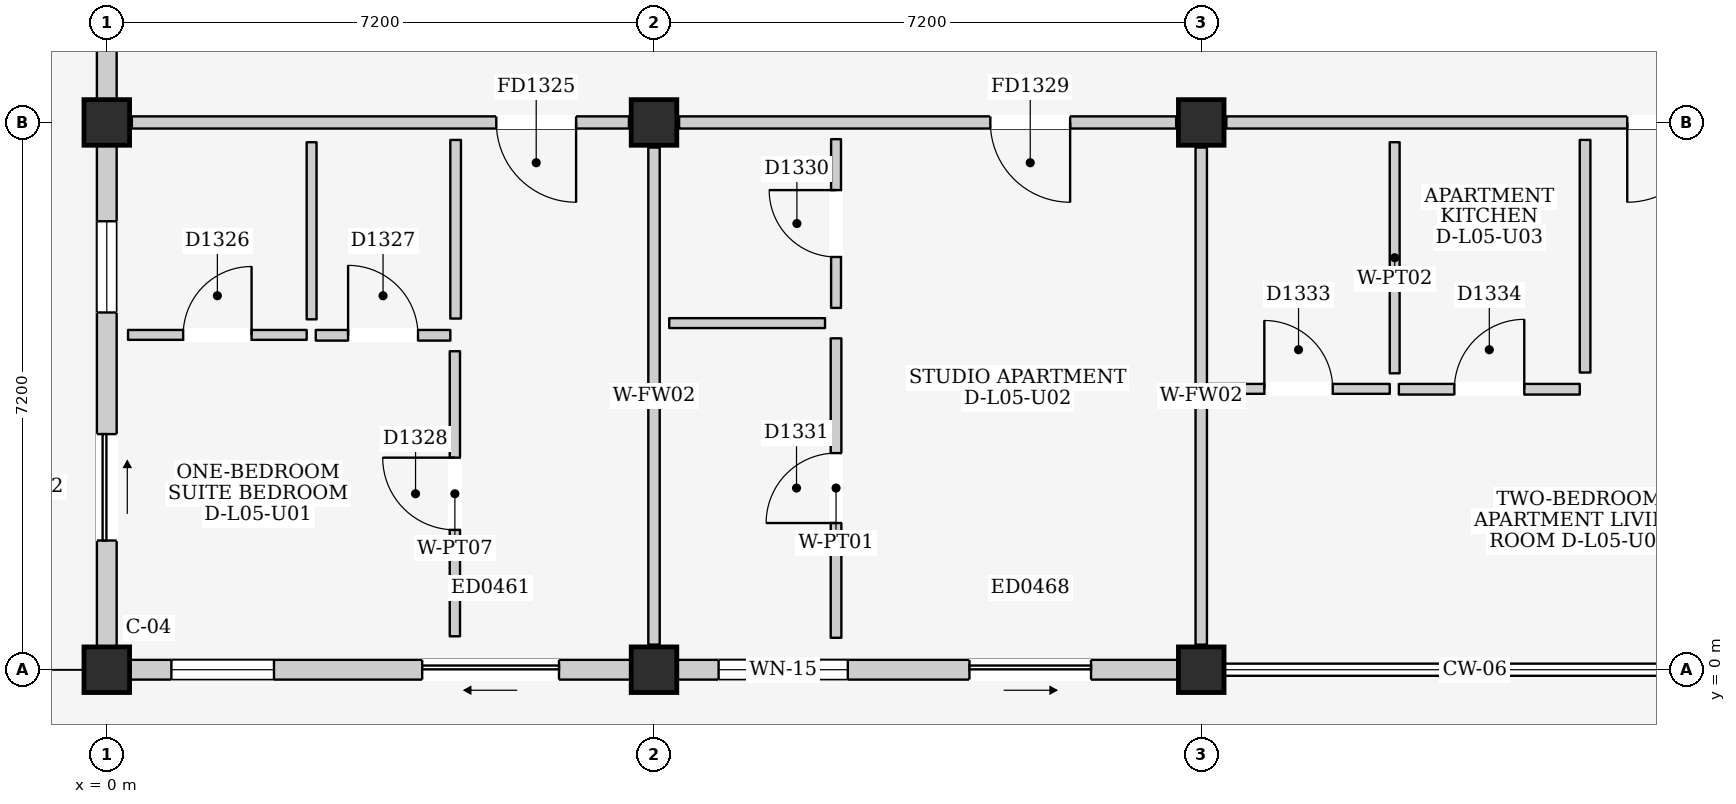
"""IFC4 building model, lengths in metres.
Left out: names, types, materials, properties, quantities, classifications, styles, units other than length and angle.
Written with IfcOpenShell. Run it as: python <this file> out.ifc"""

import sys

from ifc_helpers import new_model, si_unit, direction, frame, frame_2d, origin, origin_2d, place, context, subcontext, project, spatial, rectangle, extrude, element, fill, save


model = new_model("IFC4")
c1 = context("Model", 3, precision=1e-05, world=origin(), true_north=direction((0.0, 1.0)))
c2 = subcontext(c1, "Body", "Model", "MODEL_VIEW")
j1 = project(units=[si_unit("LENGTHUNIT", "METRE"), si_unit("PLANEANGLEUNIT", "RADIAN")], contexts=[c1])
p1 = place(None, origin())
s1 = spatial("IfcSite", under=j1, at=p1, CompositionType="ELEMENT")
p2 = place(p1, origin())
s2 = spatial("IfcBuilding", under=s1, at=p2, CompositionType="ELEMENT")
p3 = place(p2, frame((0.0, 0.0, 18.6)))
s3 = spatial("IfcBuildingStorey", under=s2, at=p3, CompositionType="ELEMENT", Elevation=18.6)
for number, where, z_axis, x_axis in (
    (1, (0.0, 0.0, 0.0), (0.0, 0.0, 1.0), (1.0, 0.0, 0.0)),
    (2, (0.0, 7.2, 0.0), (0.0, 0.0, 1.0), (1.0, 0.0, 0.0)),
    (3, (7.2, 0.0, 0.0), (0.0, 0.0, 1.0), (1.0, 0.0, 0.0)),
    (4, (7.2, 7.2, 0.0), (0.0, 0.0, 1.0), (1.0, 0.0, 0.0)),
    (5, (14.4, 0.0, 0.0), (0.0, 0.0, 1.0), (1.0, 0.0, 0.0)),
    (6, (14.4, 7.2, 0.0), (0.0, 0.0, 1.0), (1.0, 0.0, 0.0)),
):
    element("IfcColumn", number, at=place(p3, frame(where, z_axis=z_axis, x_axis=x_axis)), inside=s3, PredefinedType="COLUMN", context=c2, shape_type="SweptSolid", body=[
        extrude(rectangle(XDim=0.6, YDim=0.6, at=origin_2d()), origin(), (0.0, 0.0, 1.0), 3.3),
    ])
p4 = place(p3, frame((0.3, 0.0, 0.0), z_axis=(0.0, 0.0, 1.0), x_axis=(1.0, 0.0, 0.0)))
e7 = element("IfcWall", 7, at=p4, inside=s3, PredefinedType="ELEMENTEDWALL", context=c2, shape_type="SweptSolid", body=[
    extrude(rectangle(XDim=6.6, YDim=0.26, at=frame_2d((3.3, 0.0))), origin(), (0.0, 0.0, 1.0), 2.595),
])
p5 = place(p4, frame((3.85, 0.0, 0.0)))
e8 = element("IfcOpeningElement", 8, at=p5, cuts=e7, PredefinedType="OPENING", context=c2, shape_type="SweptSolid", body=[
    extrude(rectangle(XDim=1.8, YDim=2.12, at=frame_2d((0.9, 1.06))), frame((0.0, 0.145, 0.0), z_axis=(0.0, -1.0, 0.0), x_axis=(1.0, 0.0, 0.0)), (0.0, 0.0, 1.0), 0.29),
])
p6 = place(p4, frame((0.55, 0.0, 0.9)))
e9 = element("IfcOpeningElement", 9, at=p6, cuts=e7, PredefinedType="OPENING", context=c2, shape_type="SweptSolid", body=[
    extrude(rectangle(XDim=1.35, YDim=1.5, at=frame_2d((0.675, 0.75))), frame((0.0, 0.145, 0.0), z_axis=(0.0, -1.0, 0.0), x_axis=(1.0, 0.0, 0.0)), (0.0, 0.0, 1.0), 0.29),
])
p7 = place(p3, frame((0.0, 0.3, 0.0), z_axis=(0.0, 0.0, 1.0), x_axis=(0.0, 1.0, 0.0)))
e10 = element("IfcWall", 10, at=p7, inside=s3, PredefinedType="ELEMENTEDWALL", context=c2, shape_type="SweptSolid", body=[
    extrude(rectangle(XDim=6.6, YDim=0.26, at=frame_2d((3.3, 0.0))), origin(), (0.0, 0.0, 1.0), 2.595),
])
p8 = place(p7, frame((1.4, 0.0, 0.0)))
e11 = element("IfcOpeningElement", 11, at=p8, cuts=e10, PredefinedType="OPENING", context=c2, shape_type="SweptSolid", body=[
    extrude(rectangle(XDim=1.4, YDim=2.1, at=frame_2d((0.7, 1.05))), frame((0.0, 0.145, 0.0), z_axis=(0.0, -1.0, 0.0), x_axis=(1.0, 0.0, 0.0)), (0.0, 0.0, 1.0), 0.29),
])
p9 = place(p7, frame((4.4, 0.0, 0.95)))
e12 = element("IfcOpeningElement", 12, at=p9, cuts=e10, PredefinedType="OPENING", context=c2, shape_type="SweptSolid", body=[
    extrude(rectangle(XDim=1.2, YDim=1.35, at=frame_2d((0.6, 0.675))), frame((0.0, 0.145, 0.0), z_axis=(0.0, -1.0, 0.0), x_axis=(1.0, 0.0, 0.0)), (0.0, 0.0, 1.0), 0.29),
])
p10 = place(p3, frame((0.0, 7.5, 0.0), z_axis=(0.0, 0.0, 1.0), x_axis=(0.0, 1.0, 0.0)))
e13 = element("IfcWall", 13, at=p10, inside=s3, PredefinedType="ELEMENTEDWALL", context=c2, shape_type="SweptSolid", body=[
    extrude(rectangle(XDim=6.6, YDim=0.26, at=frame_2d((3.3, 0.0))), origin(), (0.0, 0.0, 1.0), 2.595),
])
p11 = place(p10, frame((3.65, 0.0, 0.0)))
e14 = element("IfcOpeningElement", 14, at=p11, cuts=e13, PredefinedType="OPENING", context=c2, shape_type="SweptSolid", body=[
    extrude(rectangle(XDim=1.4, YDim=2.1, at=frame_2d((0.7, 1.05))), frame((0.0, 0.145, 0.0), z_axis=(0.0, -1.0, 0.0), x_axis=(1.0, 0.0, 0.0)), (0.0, 0.0, 1.0), 0.29),
])
p12 = place(p3, frame((7.5, 0.0, 0.0), z_axis=(0.0, 0.0, 1.0), x_axis=(1.0, 0.0, 0.0)))
e15 = element("IfcWall", 15, at=p12, inside=s3, PredefinedType="ELEMENTEDWALL", context=c2, shape_type="SweptSolid", body=[
    extrude(rectangle(XDim=6.6, YDim=0.26, at=frame_2d((3.3, 0.0))), origin(), (0.0, 0.0, 1.0), 2.595),
])
p13 = place(p12, frame((3.85, 0.0, 0.0)))
e16 = element("IfcOpeningElement", 16, at=p13, cuts=e15, PredefinedType="OPENING", context=c2, shape_type="SweptSolid", body=[
    extrude(rectangle(XDim=1.6, YDim=2.12, at=frame_2d((0.8, 1.06))), frame((0.0, 0.145, 0.0), z_axis=(0.0, -1.0, 0.0), x_axis=(1.0, 0.0, 0.0)), (0.0, 0.0, 1.0), 0.29),
])
p14 = place(p12, frame((0.55, 0.0, 0.9)))
e17 = element("IfcOpeningElement", 17, at=p14, cuts=e15, PredefinedType="OPENING", context=c2, shape_type="SweptSolid", body=[
    extrude(rectangle(XDim=1.7, YDim=1.45, at=frame_2d((0.85, 0.725))), frame((0.0, 0.145, 0.0), z_axis=(0.0, -1.0, 0.0), x_axis=(1.0, 0.0, 0.0)), (0.0, 0.0, 1.0), 0.29),
])
p15 = place(p3, frame((0.33, 7.2, 0.0), z_axis=(0.0, 0.0, 1.0), x_axis=(1.0, 0.0, 0.0)))
e18 = element("IfcWall", 18, at=p15, inside=s3, PredefinedType="PARTITIONING", context=c2, shape_type="SweptSolid", body=[
    extrude(rectangle(XDim=6.54, YDim=0.16, at=frame_2d((3.27, 0.0))), origin(), (0.0, 0.0, 1.0), 2.445),
])
p16 = place(p15, frame((4.795, 0.0, 0.0)))
e19 = element("IfcOpeningElement", 19, at=p16, cuts=e18, PredefinedType="OPENING", context=c2, shape_type="SweptSolid", body=[
    extrude(rectangle(XDim=1.05, YDim=2.15, at=frame_2d((0.525, 1.075))), frame((0.0, 0.095, 0.0), z_axis=(0.0, -1.0, 0.0), x_axis=(1.0, 0.0, 0.0)), (0.0, 0.0, 1.0), 0.19),
])
p17 = place(p3, frame((7.2, 0.33, 0.0), z_axis=(0.0, 0.0, 1.0), x_axis=(0.0, 1.0, 0.0)))
e20 = element("IfcWall", 20, at=p17, inside=s3, PredefinedType="PARTITIONING", context=c2, shape_type="SweptSolid", body=[
    extrude(rectangle(XDim=6.54, YDim=0.15, at=frame_2d((3.27, 0.0))), origin(), (0.0, 0.0, 1.0), 2.545),
])
p18 = place(p3, frame((0.28, 4.405, 0.0), z_axis=(0.0, 0.0, 1.0), x_axis=(1.0, 0.0, 0.0)))
e21 = element("IfcWall", 21, at=p18, inside=s3, PredefinedType="PARTITIONING", context=c2, shape_type="SweptSolid", body=[
    extrude(rectangle(XDim=2.35, YDim=0.13, at=frame_2d((1.175, 0.0))), origin(), (0.0, 0.0, 1.0), 3.06),
])
p19 = place(p18, frame((0.725, 0.0, 0.0)))
e22 = element("IfcOpeningElement", 22, at=p19, cuts=e21, PredefinedType="OPENING", context=c2, shape_type="SweptSolid", body=[
    extrude(rectangle(XDim=0.9, YDim=2.1, at=frame_2d((0.45, 1.05))), frame((0.0, 0.08, 0.0), z_axis=(0.0, -1.0, 0.0), x_axis=(1.0, 0.0, 0.0)), (0.0, 0.0, 1.0), 0.16),
])
p20 = place(p3, frame((2.695, 4.61, 0.0), z_axis=(0.0, 0.0, 1.0), x_axis=(0.0, 1.0, 0.0)))
e23 = element("IfcWall", 23, at=p20, inside=s3, PredefinedType="PARTITIONING", context=c2, shape_type="SweptSolid", body=[
    extrude(rectangle(XDim=2.33, YDim=0.13, at=frame_2d((1.165, 0.0))), origin(), (0.0, 0.0, 1.0), 3.06),
])
p21 = place(p3, frame((2.75, 4.4, 0.0), z_axis=(0.0, 0.0, 1.0), x_axis=(1.0, 0.0, 0.0)))
e24 = element("IfcWall", 24, at=p21, inside=s3, PredefinedType="PARTITIONING", context=c2, shape_type="SweptSolid", body=[
    extrude(rectangle(XDim=1.77, YDim=0.14, at=frame_2d((0.885, 0.0))), origin(), (0.0, 0.0, 1.0), 3.06),
])
p22 = place(p21, frame((0.425, 0.0, 0.0)))
e25 = element("IfcOpeningElement", 25, at=p22, cuts=e24, PredefinedType="OPENING", context=c2, shape_type="SweptSolid", body=[
    extrude(rectangle(XDim=0.92, YDim=2.1, at=frame_2d((0.46, 1.05))), frame((0.0, 0.085, 0.0), z_axis=(0.0, -1.0, 0.0), x_axis=(1.0, 0.0, 0.0)), (0.0, 0.0, 1.0), 0.17),
])
p23 = place(p3, frame((4.59, 4.62, 0.0), z_axis=(0.0, 0.0, 1.0), x_axis=(0.0, 1.0, 0.0)))
e26 = element("IfcWall", 26, at=p23, inside=s3, PredefinedType="PARTITIONING", context=c2, shape_type="SweptSolid", body=[
    extrude(rectangle(XDim=2.35, YDim=0.14, at=frame_2d((1.175, 0.0))), origin(), (0.0, 0.0, 1.0), 3.06),
])
p24 = place(p3, frame((4.58, 0.44, 0.0), z_axis=(0.0, 0.0, 1.0), x_axis=(0.0, 1.0, 0.0)))
e27 = element("IfcWall", 27, at=p24, inside=s3, PredefinedType="PARTITIONING", context=c2, shape_type="SweptSolid", body=[
    extrude(rectangle(XDim=3.75, YDim=0.135, at=frame_2d((1.875, 0.0))), origin(), (0.0, 0.0, 1.0), 3.06),
])
p25 = place(p24, frame((1.4, 0.0, 0.0)))
e28 = element("IfcOpeningElement", 28, at=p25, cuts=e27, PredefinedType="OPENING", context=c2, shape_type="SweptSolid", body=[
    extrude(rectangle(XDim=0.95, YDim=2.15, at=frame_2d((0.475, 1.075))), frame((0.0, 0.083, 0.0), z_axis=(0.0, -1.0, 0.0), x_axis=(1.0, 0.0, 0.0)), (0.0, 0.0, 1.0), 0.165),
])
p26 = place(p3, frame((7.53, 7.2, 0.0), z_axis=(0.0, 0.0, 1.0), x_axis=(1.0, 0.0, 0.0)))
e29 = element("IfcWall", 29, at=p26, inside=s3, PredefinedType="PARTITIONING", context=c2, shape_type="SweptSolid", body=[
    extrude(rectangle(XDim=6.54, YDim=0.16, at=frame_2d((3.27, 0.0))), origin(), (0.0, 0.0, 1.0), 2.445),
])
p27 = place(p26, frame((4.095, 0.0, 0.0)))
e30 = element("IfcOpeningElement", 30, at=p27, cuts=e29, PredefinedType="OPENING", context=c2, shape_type="SweptSolid", body=[
    extrude(rectangle(XDim=1.05, YDim=2.15, at=frame_2d((0.525, 1.075))), frame((0.0, 0.095, 0.0), z_axis=(0.0, -1.0, 0.0), x_axis=(1.0, 0.0, 0.0)), (0.0, 0.0, 1.0), 0.19),
])
p28 = place(p3, frame((14.4, 0.33, 0.0), z_axis=(0.0, 0.0, 1.0), x_axis=(0.0, 1.0, 0.0)))
e31 = element("IfcWall", 31, at=p28, inside=s3, PredefinedType="PARTITIONING", context=c2, shape_type="SweptSolid", body=[
    extrude(rectangle(XDim=6.54, YDim=0.15, at=frame_2d((3.27, 0.0))), origin(), (0.0, 0.0, 1.0), 2.545),
])
p29 = place(p3, frame((7.4, 4.56, 0.0), z_axis=(0.0, 0.0, 1.0), x_axis=(1.0, 0.0, 0.0)))
e32 = element("IfcWall", 32, at=p29, inside=s3, PredefinedType="PARTITIONING", context=c2, shape_type="SweptSolid", body=[
    extrude(rectangle(XDim=2.05, YDim=0.13, at=frame_2d((1.025, 0.0))), origin(), (0.0, 0.0, 1.0), 3.06),
])
p30 = place(p3, frame((9.595, 4.76, 0.0), z_axis=(0.0, 0.0, 1.0), x_axis=(0.0, 1.0, 0.0)))
e33 = element("IfcWall", 33, at=p30, inside=s3, PredefinedType="PARTITIONING", context=c2, shape_type="SweptSolid", body=[
    extrude(rectangle(XDim=2.22, YDim=0.13, at=frame_2d((1.11, 0.0))), origin(), (0.0, 0.0, 1.0), 3.06),
])
p31 = place(p30, frame((0.67, 0.0, 0.0)))
e34 = element("IfcOpeningElement", 34, at=p31, cuts=e33, PredefinedType="OPENING", context=c2, shape_type="SweptSolid", body=[
    extrude(rectangle(XDim=0.88, YDim=2.1, at=frame_2d((0.44, 1.05))), frame((0.0, 0.08, 0.0), z_axis=(0.0, -1.0, 0.0), x_axis=(1.0, 0.0, 0.0)), (0.0, 0.0, 1.0), 0.16),
])
p32 = place(p3, frame((9.595, 0.42, 0.0), z_axis=(0.0, 0.0, 1.0), x_axis=(0.0, 1.0, 0.0)))
e35 = element("IfcWall", 35, at=p32, inside=s3, PredefinedType="PARTITIONING", context=c2, shape_type="SweptSolid", body=[
    extrude(rectangle(XDim=3.94, YDim=0.14, at=frame_2d((1.97, 0.0))), origin(), (0.0, 0.0, 1.0), 3.06),
])
p33 = place(p32, frame((1.51, 0.0, 0.0)))
e36 = element("IfcOpeningElement", 36, at=p33, cuts=e35, PredefinedType="OPENING", context=c2, shape_type="SweptSolid", body=[
    extrude(rectangle(XDim=0.92, YDim=2.1, at=frame_2d((0.46, 1.05))), frame((0.0, 0.085, 0.0), z_axis=(0.0, -1.0, 0.0), x_axis=(1.0, 0.0, 0.0)), (0.0, 0.0, 1.0), 0.17),
])
p34 = place(p3, frame((14.73, 7.2, 0.0), z_axis=(0.0, 0.0, 1.0), x_axis=(1.0, 0.0, 0.0)))
e37 = element("IfcWall", 37, at=p34, inside=s3, PredefinedType="PARTITIONING", context=c2, shape_type="SweptSolid", body=[
    extrude(rectangle(XDim=6.54, YDim=0.16, at=frame_2d((3.27, 0.0))), origin(), (0.0, 0.0, 1.0), 2.445),
])
p35 = place(p34, frame((5.275, 0.0, 0.0)))
e38 = element("IfcOpeningElement", 38, at=p35, cuts=e37, PredefinedType="OPENING", context=c2, shape_type="SweptSolid", body=[
    extrude(rectangle(XDim=1.05, YDim=2.15, at=frame_2d((0.525, 1.075))), frame((0.0, 0.095, 0.0), z_axis=(0.0, -1.0, 0.0), x_axis=(1.0, 0.0, 0.0)), (0.0, 0.0, 1.0), 0.19),
])
p36 = place(p3, frame((14.48, 3.695, 0.0), z_axis=(0.0, 0.0, 1.0), x_axis=(1.0, 0.0, 0.0)))
e39 = element("IfcWall", 39, at=p36, inside=s3, PredefinedType="PARTITIONING", context=c2, shape_type="SweptSolid", body=[
    extrude(rectangle(XDim=2.4, YDim=0.13, at=frame_2d((1.2, 0.0))), origin(), (0.0, 0.0, 1.0), 3.06),
])
p37 = place(p36, frame((0.75, 0.0, 0.0)))
e40 = element("IfcOpeningElement", 40, at=p37, cuts=e39, PredefinedType="OPENING", context=c2, shape_type="SweptSolid", body=[
    extrude(rectangle(XDim=0.9, YDim=2.1, at=frame_2d((0.45, 1.05))), frame((0.0, 0.08, 0.0), z_axis=(0.0, -1.0, 0.0), x_axis=(1.0, 0.0, 0.0)), (0.0, 0.0, 1.0), 0.16),
])
p38 = place(p3, frame((16.945, 3.9, 0.0), z_axis=(0.0, 0.0, 1.0), x_axis=(0.0, 1.0, 0.0)))
e41 = element("IfcWall", 41, at=p38, inside=s3, PredefinedType="PARTITIONING", context=c2, shape_type="SweptSolid", body=[
    extrude(rectangle(XDim=3.04, YDim=0.13, at=frame_2d((1.52, 0.0))), origin(), (0.0, 0.0, 1.0), 3.06),
])
p39 = place(p3, frame((17.0, 3.69, 0.0), z_axis=(0.0, 0.0, 1.0), x_axis=(1.0, 0.0, 0.0)))
e42 = element("IfcWall", 42, at=p39, inside=s3, PredefinedType="PARTITIONING", context=c2, shape_type="SweptSolid", body=[
    extrude(rectangle(XDim=2.38, YDim=0.14, at=frame_2d((1.19, 0.0))), origin(), (0.0, 0.0, 1.0), 3.06),
])
p40 = place(p39, frame((0.73, 0.0, 0.0)))
e43 = element("IfcOpeningElement", 43, at=p40, cuts=e42, PredefinedType="OPENING", context=c2, shape_type="SweptSolid", body=[
    extrude(rectangle(XDim=0.92, YDim=2.1, at=frame_2d((0.46, 1.05))), frame((0.0, 0.085, 0.0), z_axis=(0.0, -1.0, 0.0), x_axis=(1.0, 0.0, 0.0)), (0.0, 0.0, 1.0), 0.17),
])
p41 = place(p3, frame((19.45, 3.91, 0.0), z_axis=(0.0, 0.0, 1.0), x_axis=(0.0, 1.0, 0.0)))
e44 = element("IfcWall", 44, at=p41, inside=s3, PredefinedType="PARTITIONING", context=c2, shape_type="SweptSolid", body=[
    extrude(rectangle(XDim=3.06, YDim=0.14, at=frame_2d((1.53, 0.0))), origin(), (0.0, 0.0, 1.0), 3.06),
])
p42 = place(p5, frame((1.8, 0.0, 0.0), z_axis=(0.0, 0.0, 1.0), x_axis=(-1.0, 0.0, 0.0)))
e45 = element("IfcDoor", 45, at=p42, inside=s3, OperationType="SLIDING_TO_LEFT", PredefinedType="DOOR", context=c2, shape_type="SweptSolid", body=[
    extrude(rectangle(XDim=1.8, YDim=2.12, at=frame_2d((0.9, 1.06))), frame((0.0, 0.025, 0.0), z_axis=(0.0, -1.0, 0.0), x_axis=(1.0, 0.0, 0.0)), (0.0, 0.0, 1.0), 0.05),
])
fill(e8, e45)
p43 = place(p6, origin())
e46 = element("IfcWindow", 46, at=p43, inside=s3, PartitioningType="SINGLE_PANEL", PredefinedType="WINDOW", context=c2, shape_type="SweptSolid", body=[
    extrude(rectangle(XDim=1.35, YDim=1.5, at=frame_2d((0.675, 0.75))), frame((0.0, 0.03, 0.0), z_axis=(0.0, -1.0, 0.0), x_axis=(1.0, 0.0, 0.0)), (0.0, 0.0, 1.0), 0.06),
])
fill(e9, e46)
p44 = place(p8, frame((1.4, 0.0, 0.0), z_axis=(0.0, 0.0, 1.0), x_axis=(-1.0, 0.0, 0.0)))
e47 = element("IfcDoor", 47, at=p44, inside=s3, OperationType="SLIDING_TO_RIGHT", PredefinedType="DOOR", context=c2, shape_type="SweptSolid", body=[
    extrude(rectangle(XDim=1.4, YDim=2.1, at=frame_2d((0.7, 1.05))), frame((0.0, 0.025, 0.0), z_axis=(0.0, -1.0, 0.0), x_axis=(1.0, 0.0, 0.0)), (0.0, 0.0, 1.0), 0.05),
])
fill(e11, e47)
p45 = place(p9, origin())
e48 = element("IfcWindow", 48, at=p45, inside=s3, PartitioningType="SINGLE_PANEL", PredefinedType="WINDOW", context=c2, shape_type="SweptSolid", body=[
    extrude(rectangle(XDim=1.2, YDim=1.35, at=frame_2d((0.6, 0.675))), frame((0.0, 0.03, 0.0), z_axis=(0.0, -1.0, 0.0), x_axis=(1.0, 0.0, 0.0)), (0.0, 0.0, 1.0), 0.06),
])
fill(e12, e48)
p46 = place(p13, frame((1.6, 0.0, 0.0), z_axis=(0.0, 0.0, 1.0), x_axis=(-1.0, 0.0, 0.0)))
e49 = element("IfcDoor", 49, at=p46, inside=s3, OperationType="SLIDING_TO_RIGHT", PredefinedType="DOOR", context=c2, shape_type="SweptSolid", body=[
    extrude(rectangle(XDim=1.6, YDim=2.12, at=frame_2d((0.8, 1.06))), frame((0.0, 0.025, 0.0), z_axis=(0.0, -1.0, 0.0), x_axis=(1.0, 0.0, 0.0)), (0.0, 0.0, 1.0), 0.05),
])
fill(e16, e49)
p47 = place(p14, origin())
e50 = element("IfcWindow", 50, at=p47, inside=s3, PartitioningType="DOUBLE_PANEL_VERTICAL", PredefinedType="WINDOW", context=c2, shape_type="SweptSolid", body=[
    extrude(rectangle(XDim=1.7, YDim=1.45, at=frame_2d((0.85, 0.725))), frame((0.0, 0.03, 0.0), z_axis=(0.0, -1.0, 0.0), x_axis=(1.0, 0.0, 0.0)), (0.0, 0.0, 1.0), 0.06),
])
fill(e17, e50)
p48 = place(p16, frame((1.05, 0.0, 0.0), z_axis=(0.0, 0.0, 1.0), x_axis=(-1.0, 0.0, 0.0)))
e51 = element("IfcDoor", 51, at=p48, inside=s3, OperationType="SINGLE_SWING_LEFT", PredefinedType="DOOR", context=c2, shape_type="SweptSolid", body=[
    extrude(rectangle(XDim=1.05, YDim=2.15, at=frame_2d((0.525, 1.075))), frame((0.0, 0.025, 0.0), z_axis=(0.0, -1.0, 0.0), x_axis=(1.0, 0.0, 0.0)), (0.0, 0.0, 1.0), 0.05),
])
fill(e19, e51)
p49 = place(p19, origin())
e52 = element("IfcDoor", 52, at=p49, inside=s3, OperationType="SINGLE_SWING_RIGHT", PredefinedType="DOOR", context=c2, shape_type="SweptSolid", body=[
    extrude(rectangle(XDim=0.9, YDim=2.1, at=frame_2d((0.45, 1.05))), frame((0.0, 0.025, 0.0), z_axis=(0.0, -1.0, 0.0), x_axis=(1.0, 0.0, 0.0)), (0.0, 0.0, 1.0), 0.05),
])
fill(e22, e52)
p50 = place(p22, origin())
e53 = element("IfcDoor", 53, at=p50, inside=s3, OperationType="SINGLE_SWING_LEFT", PredefinedType="DOOR", context=c2, shape_type="SweptSolid", body=[
    extrude(rectangle(XDim=0.92, YDim=2.1, at=frame_2d((0.46, 1.05))), frame((0.0, 0.025, 0.0), z_axis=(0.0, -1.0, 0.0), x_axis=(1.0, 0.0, 0.0)), (0.0, 0.0, 1.0), 0.05),
])
fill(e25, e53)
p51 = place(p25, origin())
e54 = element("IfcDoor", 54, at=p51, inside=s3, OperationType="SINGLE_SWING_RIGHT", PredefinedType="DOOR", context=c2, shape_type="SweptSolid", body=[
    extrude(rectangle(XDim=0.95, YDim=2.15, at=frame_2d((0.475, 1.075))), frame((0.0, 0.025, 0.0), z_axis=(0.0, -1.0, 0.0), x_axis=(1.0, 0.0, 0.0)), (0.0, 0.0, 1.0), 0.05),
])
fill(e28, e54)
p52 = place(p27, frame((1.05, 0.0, 0.0), z_axis=(0.0, 0.0, 1.0), x_axis=(-1.0, 0.0, 0.0)))
e55 = element("IfcDoor", 55, at=p52, inside=s3, OperationType="SINGLE_SWING_LEFT", PredefinedType="DOOR", context=c2, shape_type="SweptSolid", body=[
    extrude(rectangle(XDim=1.05, YDim=2.15, at=frame_2d((0.525, 1.075))), frame((0.0, 0.025, 0.0), z_axis=(0.0, -1.0, 0.0), x_axis=(1.0, 0.0, 0.0)), (0.0, 0.0, 1.0), 0.05),
])
fill(e30, e55)
p53 = place(p31, origin())
e56 = element("IfcDoor", 56, at=p53, inside=s3, OperationType="SINGLE_SWING_RIGHT", PredefinedType="DOOR", context=c2, shape_type="SweptSolid", body=[
    extrude(rectangle(XDim=0.88, YDim=2.1, at=frame_2d((0.44, 1.05))), frame((0.0, 0.025, 0.0), z_axis=(0.0, -1.0, 0.0), x_axis=(1.0, 0.0, 0.0)), (0.0, 0.0, 1.0), 0.05),
])
fill(e34, e56)
p54 = place(p33, origin())
e57 = element("IfcDoor", 57, at=p54, inside=s3, OperationType="SINGLE_SWING_LEFT", PredefinedType="DOOR", context=c2, shape_type="SweptSolid", body=[
    extrude(rectangle(XDim=0.92, YDim=2.1, at=frame_2d((0.46, 1.05))), frame((0.0, 0.025, 0.0), z_axis=(0.0, -1.0, 0.0), x_axis=(1.0, 0.0, 0.0)), (0.0, 0.0, 1.0), 0.05),
])
fill(e36, e57)
p55 = place(p35, frame((1.05, 0.0, 0.0), z_axis=(0.0, 0.0, 1.0), x_axis=(-1.0, 0.0, 0.0)))
e58 = element("IfcDoor", 58, at=p55, inside=s3, OperationType="SINGLE_SWING_RIGHT", PredefinedType="DOOR", context=c2, shape_type="SweptSolid", body=[
    extrude(rectangle(XDim=1.05, YDim=2.15, at=frame_2d((0.525, 1.075))), frame((0.0, 0.025, 0.0), z_axis=(0.0, -1.0, 0.0), x_axis=(1.0, 0.0, 0.0)), (0.0, 0.0, 1.0), 0.05),
])
fill(e38, e58)
p56 = place(p37, origin())
e59 = element("IfcDoor", 59, at=p56, inside=s3, OperationType="SINGLE_SWING_LEFT", PredefinedType="DOOR", context=c2, shape_type="SweptSolid", body=[
    extrude(rectangle(XDim=0.9, YDim=2.1, at=frame_2d((0.45, 1.05))), frame((0.0, 0.025, 0.0), z_axis=(0.0, -1.0, 0.0), x_axis=(1.0, 0.0, 0.0)), (0.0, 0.0, 1.0), 0.05),
])
fill(e40, e59)
p57 = place(p40, origin())
e60 = element("IfcDoor", 60, at=p57, inside=s3, OperationType="SINGLE_SWING_RIGHT", PredefinedType="DOOR", context=c2, shape_type="SweptSolid", body=[
    extrude(rectangle(XDim=0.92, YDim=2.1, at=frame_2d((0.46, 1.05))), frame((0.0, 0.025, 0.0), z_axis=(0.0, -1.0, 0.0), x_axis=(1.0, 0.0, 0.0)), (0.0, 0.0, 1.0), 0.05),
])
fill(e43, e60)
save(model, sys.argv[1])
